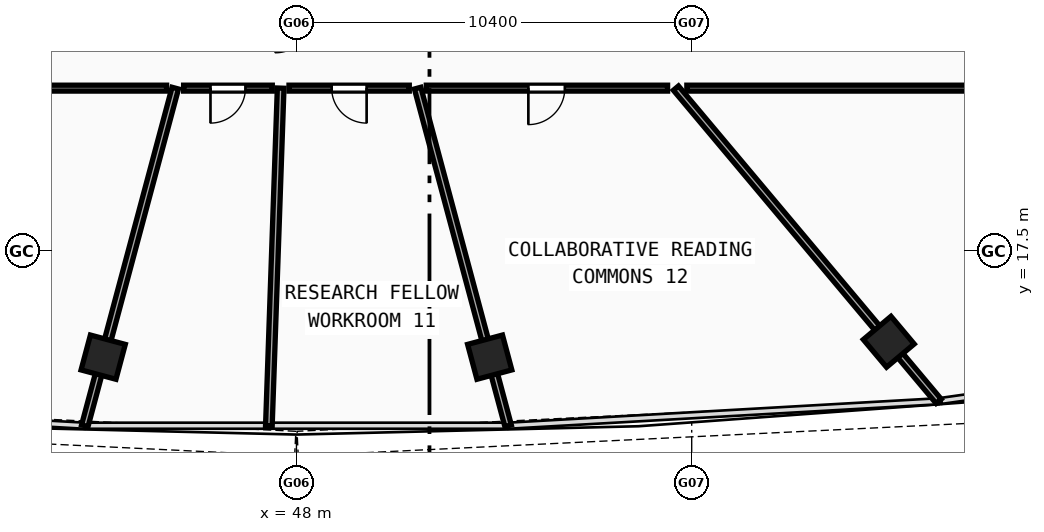
"""IFC4 building model, lengths in metres.
Left out: names, types, materials, properties, quantities, classifications, styles, units other than length and angle.
Written with IfcOpenShell. Run it as: python <this file> out.ifc"""

import sys

from ifc_helpers import new_model, si_unit, direction, frame, frame_2d, origin, origin_with_axes, origin_2d, place, context, subcontext, project, spatial, rectangle, hollow_rectangle, extrude, source, transform, mapped, element, fill, save


model = new_model("IFC4")
c1 = context("Model", 3, precision=1e-05, world=origin(), true_north=direction((0.0, 1.0)))
c2 = subcontext(c1, "Body", "Model", "MODEL_VIEW")
j1 = project(units=[si_unit("LENGTHUNIT", "METRE"), si_unit("PLANEANGLEUNIT", "RADIAN")], contexts=[c1])
p1 = place(None, origin())
s1 = spatial("IfcSite", under=j1, at=p1, CompositionType="ELEMENT")
p2 = place(p1, origin())
s2 = spatial("IfcBuilding", under=s1, at=p2, CompositionType="ELEMENT")
p3 = place(p2, frame((0.0, 0.0, 133.51)))
s3 = spatial("IfcBuildingStorey", under=s2, at=p3, CompositionType="ELEMENT", Elevation=133.51)
m1 = source(origin(), c2, "Body", "SweptSolid", [
    extrude(hollow_rectangle(XDim=0.95, YDim=0.95, WallThickness=0.04, at=origin_2d()), origin(), (0.0, 0.0, 1.0), 3.68),
])
for number, where, z_axis, x_axis in (
    (1, (42.915, 14.722, -0.26), (0.0, 0.0, 1.0), (0.966, -0.259, 0.0)),
    (2, (53.085, 14.722, -0.26), (0.0, 0.0, 1.0), (0.966, 0.259, 0.0)),
    (3, (63.585, 15.126, -0.26), (0.0, 0.0, 1.0), (0.766, 0.643, 0.0)),
):
    element("IfcColumn", number, at=place(p3, frame(where, z_axis=z_axis, x_axis=x_axis)), inside=s3, PredefinedType="COLUMN", context=c2, shape_type="MappedRepresentation", body=[
        mapped(m1, transform((0.0, 0.0, 0.0), scale=1.0)),
    ])
p4 = place(p3, frame((44.811, 21.8, 0.0), z_axis=(0.0, 0.0, 1.0), x_axis=(-0.258799340884, -0.965931105803, 0.0)))
e4 = element("IfcWall", 4, at=p4, inside=s3, PredefinedType="PARTITIONING", context=c2, shape_type="SweptSolid", body=[
    extrude(rectangle(XDim=9.196, YDim=0.175, at=frame_2d((4.598, 0.0))), origin(), (0.0, 0.0, 1.0), 2.77),
])
p5 = place(p3, frame((47.584, 21.8, 0.0), z_axis=(0.0, 0.0, 1.0), x_axis=(-0.034885165757, -0.999391327364, 0.0)))
e5 = element("IfcWall", 5, at=p5, inside=s3, PredefinedType="PARTITIONING", context=c2, shape_type="SweptSolid", body=[
    extrude(rectangle(XDim=8.888, YDim=0.175, at=frame_2d((4.444, 0.0))), origin(), (0.0, 0.0, 1.0), 2.77),
])
p6 = place(p3, frame((51.189, 21.8, 0.0), z_axis=(0.0, 0.0, 1.0), x_axis=(0.258799340884, -0.965931105803, 0.0)))
e6 = element("IfcWall", 6, at=p6, inside=s3, PredefinedType="PARTITIONING", context=c2, shape_type="SweptSolid", body=[
    extrude(rectangle(XDim=9.196, YDim=0.175, at=frame_2d((4.598, 0.0))), origin(), (0.0, 0.0, 1.0), 2.77),
])
p7 = place(p3, frame((57.985, 21.8, 0.0), z_axis=(0.0, 0.0, 1.0), x_axis=(0.642770875896, -0.766058484125, 0.0)))
e7 = element("IfcWall", 7, at=p7, inside=s3, PredefinedType="PARTITIONING", context=c2, shape_type="SweptSolid", body=[
    extrude(rectangle(XDim=10.755, YDim=0.175, at=frame_2d((5.377, 0.0))), origin(), (0.0, 0.0, 1.0), 2.77),
])
p8 = place(p3, frame((66.4, 21.8, 0.0), z_axis=(0.0, 0.0, 1.0), x_axis=(-1.0, 0.0, 0.0)))
e8 = element("IfcWall", 8, at=p8, inside=s3, PredefinedType="PARTITIONING", context=c2, shape_type="SweptSolid", body=[
    extrude(rectangle(XDim=8.127, YDim=0.155, at=frame_2d((4.064, 0.0))), origin(), (0.0, 0.0, 1.0), 3.02),
])
p9 = place(p3, frame((57.765, 21.8, 0.0), z_axis=(0.0, 0.0, 1.0), x_axis=(-1.0, 0.0, 0.0)))
e9 = element("IfcWall", 9, at=p9, inside=s3, PredefinedType="PARTITIONING", context=c2, shape_type="SweptSolid", body=[
    extrude(rectangle(XDim=6.349, YDim=0.155, at=frame_2d((3.174, 0.0))), origin(), (0.0, 0.0, 1.0), 2.77),
])
p10 = place(p9, frame((2.703, 0.0, 0.0)))
e10 = element("IfcOpeningElement", 10, at=p10, cuts=e9, PredefinedType="OPENING", context=c2, shape_type="SweptSolid", body=[
    extrude(rectangle(XDim=0.96, YDim=2.12, at=frame_2d((0.48, 1.06))), frame((0.0, 0.087, 0.0), z_axis=(0.0, -1.0, 0.0), x_axis=(1.0, 0.0, 0.0)), (0.0, 0.0, 1.0), 0.175),
])
p11 = place(p3, frame((50.969, 21.8, 0.0), z_axis=(0.0, 0.0, 1.0), x_axis=(-1.0, 0.0, 0.0)))
e11 = element("IfcWall", 11, at=p11, inside=s3, PredefinedType="PARTITIONING", context=c2, shape_type="SweptSolid", body=[
    extrude(rectangle(XDim=3.165, YDim=0.155, at=frame_2d((1.582, 0.0))), origin(), (0.0, 0.0, 1.0), 3.42),
])
p12 = place(p11, frame((1.122, 0.0, 0.0)))
e12 = element("IfcOpeningElement", 12, at=p12, cuts=e11, PredefinedType="OPENING", context=c2, shape_type="SweptSolid", body=[
    extrude(rectangle(XDim=0.92, YDim=2.1, at=frame_2d((0.46, 1.05))), frame((0.0, 0.087, 0.0), z_axis=(0.0, -1.0, 0.0), x_axis=(1.0, 0.0, 0.0)), (0.0, 0.0, 1.0), 0.175),
])
p13 = place(p3, frame((47.364, 21.8, 0.0), z_axis=(0.0, 0.0, 1.0), x_axis=(-1.0, 0.0, 0.0)))
e13 = element("IfcWall", 13, at=p13, inside=s3, PredefinedType="PARTITIONING", context=c2, shape_type="SweptSolid", body=[
    extrude(rectangle(XDim=2.333, YDim=0.155, at=frame_2d((1.167, 0.0))), origin(), (0.0, 0.0, 1.0), 3.42),
])
p14 = place(p13, frame((0.706, 0.0, 0.0)))
e14 = element("IfcOpeningElement", 14, at=p14, cuts=e13, PredefinedType="OPENING", context=c2, shape_type="SweptSolid", body=[
    extrude(rectangle(XDim=0.92, YDim=2.1, at=frame_2d((0.46, 1.05))), frame((0.0, 0.087, 0.0), z_axis=(0.0, -1.0, 0.0), x_axis=(1.0, 0.0, 0.0)), (0.0, 0.0, 1.0), 0.175),
])
p15 = place(p3, frame((44.583, 21.8, 0.0), z_axis=(0.0, 0.0, 1.0), x_axis=(-1.0, 0.0, 0.0)))
e15 = element("IfcWall", 15, at=p15, inside=s3, PredefinedType="PARTITIONING", context=c2, shape_type="SweptSolid", body=[
    extrude(rectangle(XDim=14.983, YDim=0.155, at=frame_2d((7.492, 0.0))), origin(), (0.0, 0.0, 1.0), 2.77),
])
p16 = place(p15, frame((7.133, 0.0, 0.0)))
e16 = element("IfcOpeningElement", 16, at=p16, cuts=e15, PredefinedType="OPENING", context=c2, shape_type="SweptSolid", body=[
    extrude(rectangle(XDim=0.96, YDim=2.12, at=frame_2d((0.48, 1.06))), frame((0.0, 0.087, 0.0), z_axis=(0.0, -1.0, 0.0), x_axis=(1.0, 0.0, 0.0)), (0.0, 0.0, 1.0), 0.175),
])
m2 = source(origin(), c2, "Body", "SweptSolid", [
    extrude(rectangle(XDim=0.92, YDim=2.1, at=frame_2d((0.46, 1.05))), frame((0.0, 0.025, 0.0), z_axis=(0.0, -1.0, 0.0), x_axis=(1.0, 0.0, 0.0)), (0.0, 0.0, 1.0), 0.05),
])
p17 = place(p14, origin_with_axes())
e17 = element("IfcDoor", 17, at=p17, inside=s3, OperationType="SINGLE_SWING_RIGHT", PredefinedType="DOOR", context=c2, shape_type="MappedRepresentation", body=[
    mapped(m2, transform((0.0, 0.0, 0.0), scale=1.0)),
])
fill(e14, e17)
p18 = place(p12, origin_with_axes())
e18 = element("IfcDoor", 18, at=p18, inside=s3, OperationType="SINGLE_SWING_LEFT", PredefinedType="DOOR", context=c2, shape_type="MappedRepresentation", body=[
    mapped(m2, transform((0.0, 0.0, 0.0), scale=1.0)),
])
fill(e12, e18)
m3 = source(origin(), c2, "Body", "SweptSolid", [
    extrude(rectangle(XDim=0.96, YDim=2.12, at=frame_2d((0.48, 1.06))), frame((0.0, 0.025, 0.0), z_axis=(0.0, -1.0, 0.0), x_axis=(1.0, 0.0, 0.0)), (0.0, 0.0, 1.0), 0.05),
])
p19 = place(p10, origin_with_axes())
e19 = element("IfcDoor", 19, at=p19, inside=s3, OperationType="SINGLE_SWING_RIGHT", PredefinedType="DOOR", context=c2, shape_type="MappedRepresentation", body=[
    mapped(m3, transform((0.0, 0.0, 0.0), scale=1.0)),
])
fill(e10, e19)
save(model, sys.argv[1])
